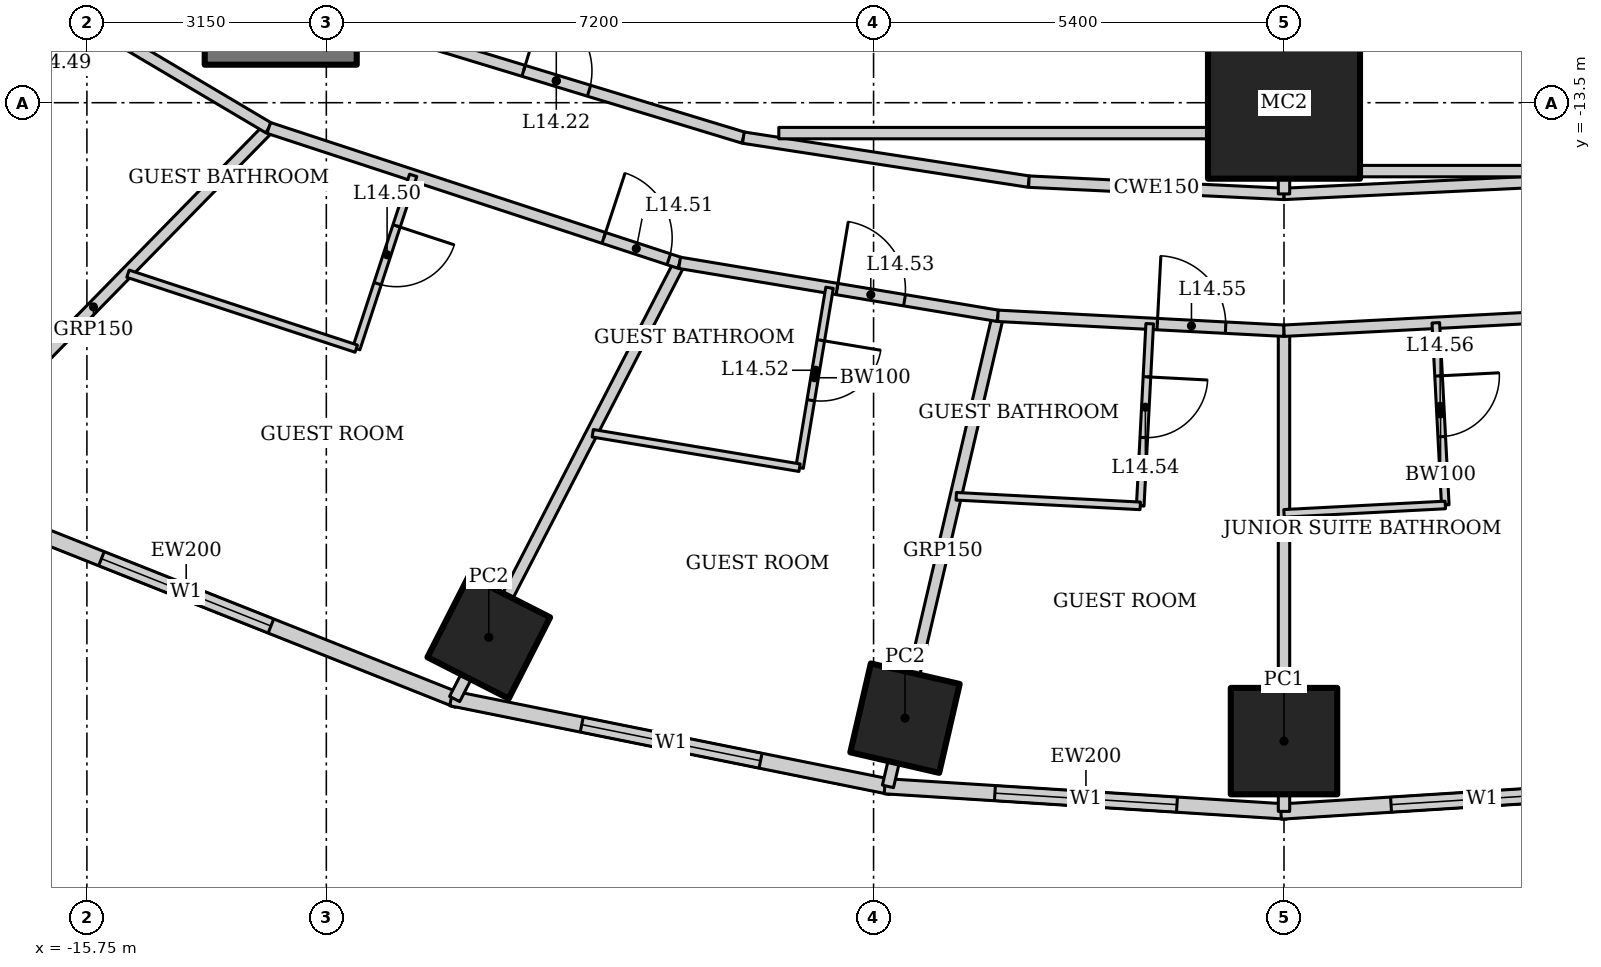
"""IFC4 building model, lengths in metres.
Left out: names, types, materials, properties, quantities, classifications, styles, units other than length and angle.
Written with IfcOpenShell. Run it as: python <this file> out.ifc"""

import sys

from ifc_helpers import new_model, si_unit, direction, frame, frame_2d, origin, origin_2d, place, context, subcontext, project, spatial, rectangle, hollow_rectangle, extrude, element, fill, save


model = new_model("IFC4")
c1 = context("Model", 3, precision=1e-05, world=origin(), true_north=direction((0.0, 1.0)))
c2 = subcontext(c1, "Body", "Model", "MODEL_VIEW")
j1 = project(units=[si_unit("LENGTHUNIT", "METRE"), si_unit("PLANEANGLEUNIT", "RADIAN")], contexts=[c1])
p1 = place(None, origin())
s1 = spatial("IfcSite", under=j1, at=p1, CompositionType="ELEMENT")
p2 = place(p1, origin())
s2 = spatial("IfcBuilding", under=s1, at=p2, CompositionType="ELEMENT")
p3 = place(p2, frame((0.0, 0.0, 65.8)))
s3 = spatial("IfcBuildingStorey", under=s2, at=p3, CompositionType="ELEMENT", Elevation=65.8)
p4 = place(p3, frame((0.0, -13.5, 0.0), z_axis=(0.0, 0.0, 1.0), x_axis=(1.0, 0.0, 0.0)))
e1 = element("IfcColumn", 1, at=p4, inside=s3, PredefinedType="COLUMN", context=c2, shape_type="SweptSolid", body=[
    extrude(hollow_rectangle(XDim=2.0, YDim=2.0, WallThickness=0.17, at=origin_2d()), origin(), (0.0, 0.0, 1.0), 3.6),
])
for number, where, z_axis, x_axis in (
    (2, (-10.463, -20.534, 0.0), (0.0, 0.0, 1.0), (0.454, 0.891, 0.0)),
    (3, (-4.986, -21.598, 0.0), (0.0, 0.0, 1.0), (0.225, 0.974, 0.0)),
):
    element("IfcColumn", number, at=place(p3, frame(where, z_axis=z_axis, x_axis=x_axis)), inside=s3, PredefinedType="COLUMN", context=c2, shape_type="SweptSolid", body=[
        extrude(hollow_rectangle(XDim=1.2, YDim=1.2, WallThickness=0.1, at=origin_2d()), origin(), (0.0, 0.0, 1.0), 3.6),
    ])
p5 = place(p3, frame((0.0, -21.9, 0.0), z_axis=(0.0, 0.0, 1.0), x_axis=(1.0, 0.0, 0.0)))
e4 = element("IfcColumn", 4, at=p5, inside=s3, PredefinedType="COLUMN", context=c2, shape_type="SweptSolid", body=[
    extrude(hollow_rectangle(XDim=1.4, YDim=1.4, WallThickness=0.1, at=origin_2d()), origin(), (0.0, 0.0, 1.0), 3.6),
])
p6 = place(p3, frame((-13.2, 13.0, 0.0), z_axis=(0.0, 0.0, 1.0), x_axis=(0.0, -1.0, 0.0)))
e5 = element("IfcWall", 5, at=p6, inside=s3, PredefinedType="SHEAR", context=c2, shape_type="SweptSolid", body=[
    extrude(rectangle(XDim=26.0, YDim=2.0, at=frame_2d((13.0, 0.0))), origin(), (0.0, 0.0, 1.0), 3.6),
])
p7 = place(p6, frame((12.1, 0.0, 0.0)))
e6 = element("IfcOpeningElement", 6, at=p7, cuts=e5, PredefinedType="OPENING", context=c2, shape_type="SweptSolid", body=[
    extrude(rectangle(XDim=1.8, YDim=2.1, at=frame_2d((0.9, 1.05))), frame((0.0, 1.01, 0.0), z_axis=(0.0, -1.0, 0.0), x_axis=(1.0, 0.0, 0.0)), (0.0, 0.0, 1.0), 2.02),
])
p8 = place(p3, frame((-18.018, -18.523, 0.0), z_axis=(0.0, 0.0, 1.0), x_axis=(0.929358351251, -0.369178892895, 0.0)))
e7 = element("IfcWall", 7, at=p8, inside=s3, PredefinedType="SOLIDWALL", context=c2, shape_type="SweptSolid", body=[
    extrude(rectangle(XDim=7.692, YDim=0.2, at=frame_2d((3.846, 0.0))), origin(), (0.0, 0.0, 1.0), 3.4),
])
p9 = place(p8, frame((2.646, 0.0, 0.5)))
e8 = element("IfcOpeningElement", 8, at=p9, cuts=e7, PredefinedType="OPENING", context=c2, shape_type="SweptSolid", body=[
    extrude(rectangle(XDim=2.4, YDim=2.2, at=frame_2d((1.2, 1.1))), frame((0.0, 0.11, 0.0), z_axis=(0.0, -1.0, 0.0), x_axis=(1.0, 0.0, 0.0)), (0.0, 0.0, 1.0), 0.22),
])
p10 = place(p3, frame((-10.957, -21.337, 0.0), z_axis=(0.0, 0.0, 1.0), x_axis=(0.980251657452, -0.197754110105, 0.0)))
e9 = element("IfcWall", 9, at=p10, inside=s3, PredefinedType="SOLIDWALL", context=c2, shape_type="SweptSolid", body=[
    extrude(rectangle(XDim=5.904, YDim=0.2, at=frame_2d((2.952, 0.0))), origin(), (0.0, 0.0, 1.0), 3.4),
])
p11 = place(p10, frame((1.752, 0.0, 0.5)))
e10 = element("IfcOpeningElement", 10, at=p11, cuts=e9, PredefinedType="OPENING", context=c2, shape_type="SweptSolid", body=[
    extrude(rectangle(XDim=2.4, YDim=2.2, at=frame_2d((1.2, 1.1))), frame((0.0, 0.11, 0.0), z_axis=(0.0, -1.0, 0.0), x_axis=(1.0, 0.0, 0.0)), (0.0, 0.0, 1.0), 0.22),
])
p12 = place(p3, frame((-5.253, -22.493, 0.0), z_axis=(0.0, 0.0, 1.0), x_axis=(0.998018582375, -0.062919863585, 0.0)))
e11 = element("IfcWall", 11, at=p12, inside=s3, PredefinedType="SOLIDWALL", context=c2, shape_type="SweptSolid", body=[
    extrude(rectangle(XDim=5.304, YDim=0.2, at=frame_2d((2.652, 0.0))), origin(), (0.0, 0.0, 1.0), 3.4),
])
p13 = place(p12, frame((1.452, 0.0, 0.5)))
e12 = element("IfcOpeningElement", 12, at=p13, cuts=e11, PredefinedType="OPENING", context=c2, shape_type="SweptSolid", body=[
    extrude(rectangle(XDim=2.4, YDim=2.2, at=frame_2d((1.2, 1.1))), frame((0.0, 0.11, 0.0), z_axis=(0.0, -1.0, 0.0), x_axis=(1.0, 0.0, 0.0)), (0.0, 0.0, 1.0), 0.22),
])
p14 = place(p3, frame((-0.041, -22.827, 0.0), z_axis=(0.0, 0.0, 1.0), x_axis=(0.998018582375, 0.062919863585, 0.0)))
e13 = element("IfcWall", 13, at=p14, inside=s3, PredefinedType="SOLIDWALL", context=c2, shape_type="SweptSolid", body=[
    extrude(rectangle(XDim=5.304, YDim=0.2, at=frame_2d((2.652, 0.0))), origin(), (0.0, 0.0, 1.0), 3.4),
])
p15 = place(p14, frame((1.452, 0.0, 0.5)))
e14 = element("IfcOpeningElement", 14, at=p15, cuts=e13, PredefinedType="OPENING", context=c2, shape_type="SweptSolid", body=[
    extrude(rectangle(XDim=2.4, YDim=2.2, at=frame_2d((1.2, 1.1))), frame((0.0, 0.11, 0.0), z_axis=(0.0, -1.0, 0.0), x_axis=(1.0, 0.0, 0.0)), (0.0, 0.0, 1.0), 0.22),
])
p16 = place(p3, frame((-17.97, -18.542, 0.0), z_axis=(0.0, 0.0, 1.0), x_axis=(0.699736251994, 0.714401272147, 0.0)))
e15 = element("IfcWall", 15, at=p16, inside=s3, PredefinedType="PARTITIONING", context=c2, shape_type="SweptSolid", body=[
    extrude(rectangle(XDim=6.593, YDim=0.15, at=frame_2d((3.296, 0.0))), origin(), (0.0, 0.0, 1.0), 2.528),
])
p17 = place(p3, frame((-10.912, -21.346, 0.0), z_axis=(0.0, 0.0, 1.0), x_axis=(0.458384799126, 0.888753833145, 0.0)))
e16 = element("IfcWall", 16, at=p17, inside=s3, PredefinedType="PARTITIONING", context=c2, shape_type="SweptSolid", body=[
    extrude(rectangle(XDim=6.457, YDim=0.15, at=frame_2d((3.229, 0.0))), origin(), (0.0, 0.0, 1.0), 2.528),
])
p18 = place(p3, frame((-5.211, -22.496, 0.0), z_axis=(0.0, 0.0, 1.0), x_axis=(0.227536694087, 0.973769507042, 0.0)))
e17 = element("IfcWall", 17, at=p18, inside=s3, PredefinedType="PARTITIONING", context=c2, shape_type="SweptSolid", body=[
    extrude(rectangle(XDim=6.358, YDim=0.15, at=frame_2d((3.179, 0.0))), origin(), (0.0, 0.0, 1.0), 2.767),
])
p19 = place(p3, frame((0.0, -22.825, 0.0), z_axis=(0.0, 0.0, 1.0), x_axis=(0.0, 1.0, 0.0)))
e18 = element("IfcWall", 18, at=p19, inside=s3, PredefinedType="PARTITIONING", context=c2, shape_type="SweptSolid", body=[
    extrude(rectangle(XDim=6.325, YDim=0.15, at=frame_2d((3.162, 0.0))), origin(), (0.0, 0.0, 1.0), 2.924),
])
p20 = place(p3, frame((-18.681, -10.675, 0.0), z_axis=(0.0, 0.0, 1.0), x_axis=(0.860147339762, -0.510045639036, 0.0)))
e19 = element("IfcWall", 19, at=p20, inside=s3, PredefinedType="PARTITIONING", context=c2, shape_type="SweptSolid", body=[
    extrude(rectangle(XDim=6.19, YDim=0.15, at=frame_2d((3.095, 0.0))), origin(), (0.0, 0.0, 1.0), 3.45),
])
p21 = place(p20, frame((2.505, 0.0, 0.0)))
e20 = element("IfcOpeningElement", 20, at=p21, cuts=e19, PredefinedType="OPENING", context=c2, shape_type="SweptSolid", body=[
    extrude(rectangle(XDim=0.9, YDim=2.1, at=frame_2d((0.45, 1.05))), frame((0.0, 0.085, 0.0), z_axis=(0.0, -1.0, 0.0), x_axis=(1.0, 0.0, 0.0)), (0.0, 0.0, 1.0), 0.17),
])
p22 = place(p3, frame((-13.357, -13.832, 0.0), z_axis=(0.0, 0.0, 1.0), x_axis=(0.950106803111, -0.311924770869, 0.0)))
e21 = element("IfcWall", 21, at=p22, inside=s3, PredefinedType="PARTITIONING", context=c2, shape_type="SweptSolid", body=[
    extrude(rectangle(XDim=5.689, YDim=0.15, at=frame_2d((2.845, 0.0))), origin(), (0.0, 0.0, 1.0), 3.45),
])
p23 = place(p22, frame((4.639, 0.0, 0.0)))
e22 = element("IfcOpeningElement", 22, at=p23, cuts=e21, PredefinedType="OPENING", context=c2, shape_type="SweptSolid", body=[
    extrude(rectangle(XDim=0.9, YDim=2.1, at=frame_2d((0.45, 1.05))), frame((0.0, 0.085, 0.0), z_axis=(0.0, -1.0, 0.0), x_axis=(1.0, 0.0, 0.0)), (0.0, 0.0, 1.0), 0.17),
])
p24 = place(p3, frame((-7.952, -15.607, 0.0), z_axis=(0.0, 0.0, 1.0), x_axis=(0.98641101506, -0.164296407044, 0.0)))
e23 = element("IfcWall", 23, at=p24, inside=s3, PredefinedType="PARTITIONING", context=c2, shape_type="SweptSolid", body=[
    extrude(rectangle(XDim=4.245, YDim=0.15, at=frame_2d((2.123, 0.0))), origin(), (0.0, 0.0, 1.0), 3.45),
])
p25 = place(p24, frame((2.1, 0.0, 0.0)))
e24 = element("IfcOpeningElement", 24, at=p25, cuts=e23, PredefinedType="OPENING", context=c2, shape_type="SweptSolid", body=[
    extrude(rectangle(XDim=0.9, YDim=2.1, at=frame_2d((0.45, 1.05))), frame((0.0, 0.085, 0.0), z_axis=(0.0, -1.0, 0.0), x_axis=(1.0, 0.0, 0.0)), (0.0, 0.0, 1.0), 0.17),
])
p26 = place(p3, frame((-3.764, -16.304, 0.0), z_axis=(0.0, 0.0, 1.0), x_axis=(0.998649848759, -0.05194689186, 0.0)))
e25 = element("IfcWall", 25, at=p26, inside=s3, PredefinedType="PARTITIONING", context=c2, shape_type="SweptSolid", body=[
    extrude(rectangle(XDim=3.769, YDim=0.15, at=frame_2d((1.885, 0.0))), origin(), (0.0, 0.0, 1.0), 3.45),
])
p27 = place(p26, frame((2.1, 0.0, 0.0)))
e26 = element("IfcOpeningElement", 26, at=p27, cuts=e25, PredefinedType="OPENING", context=c2, shape_type="SweptSolid", body=[
    extrude(rectangle(XDim=0.9, YDim=2.1, at=frame_2d((0.45, 1.05))), frame((0.0, 0.085, 0.0), z_axis=(0.0, -1.0, 0.0), x_axis=(1.0, 0.0, 0.0)), (0.0, 0.0, 1.0), 0.17),
])
p28 = place(p3, frame((0.0, -16.5, 0.0), z_axis=(0.0, 0.0, 1.0), x_axis=(0.998649848759, 0.05194689186, 0.0)))
e27 = element("IfcWall", 27, at=p28, inside=s3, PredefinedType="PARTITIONING", context=c2, shape_type="SweptSolid", body=[
    extrude(rectangle(XDim=3.769, YDim=0.15, at=frame_2d((1.885, 0.0))), origin(), (0.0, 0.0, 1.0), 3.45),
])
p29 = place(p3, frame((-12.036, -12.464, 0.0), z_axis=(0.0, 0.0, 1.0), x_axis=(0.956795045135, -0.290763205385, 0.0)))
e28 = element("IfcWall", 28, at=p29, inside=s3, PredefinedType="PARTITIONING", context=c2, shape_type="SweptSolid", body=[
    extrude(rectangle(XDim=5.146, YDim=0.15, at=frame_2d((2.573, 0.0))), origin(), (0.0, 0.0, 1.0), 3.45),
])
p30 = place(p29, frame((2.123, 0.0, 0.0)))
e29 = element("IfcOpeningElement", 29, at=p30, cuts=e28, PredefinedType="OPENING", context=c2, shape_type="SweptSolid", body=[
    extrude(rectangle(XDim=0.9, YDim=2.1, at=frame_2d((0.45, 1.05))), frame((0.0, 0.085, 0.0), z_axis=(0.0, -1.0, 0.0), x_axis=(1.0, 0.0, 0.0)), (0.0, 0.0, 1.0), 0.17),
])
p31 = place(p3, frame((-7.113, -13.96, 0.0), z_axis=(0.0, 0.0, 1.0), x_axis=(0.988343461108, -0.152240608529, 0.0)))
e30 = element("IfcWall", 30, at=p31, inside=s3, PredefinedType="PARTITIONING", context=c2, shape_type="SweptSolid", body=[
    extrude(rectangle(XDim=3.801, YDim=0.15, at=frame_2d((1.9, 0.0))), origin(), (0.0, 0.0, 1.0), 3.45),
])
for number, where, z_axis, x_axis in (
    (31, (-3.356, -14.538, 0.0), (0.0, 0.0, 1.0), (0.999, -0.048, 0.0)),
    (32, (0.0, -14.7, 0.0), (0.0, 0.0, 1.0), (0.999, 0.048, 0.0)),
):
    element("IfcWall", number, at=place(p3, frame(where, z_axis=z_axis, x_axis=x_axis)), inside=s3, PredefinedType="PARTITIONING", context=c2, shape_type="SweptSolid", body=[
        extrude(rectangle(XDim=3.36, YDim=0.15, at=frame_2d((1.68, 0.0))), origin(), (0.0, 0.0, 1.0), 3.45),
    ])
p32 = place(p3, frame((0.0, -9.2, 0.0), z_axis=(0.0, 0.0, 1.0), x_axis=(0.0, -1.0, 0.0)))
e33 = element("IfcWall", 33, at=p32, inside=s3, PredefinedType="PARTITIONING", context=c2, shape_type="SweptSolid", body=[
    extrude(rectangle(XDim=5.5, YDim=0.15, at=frame_2d((2.75, 0.0))), origin(), (0.0, 0.0, 1.0), 2.924),
])
p33 = place(p3, frame((-6.647, -13.9, 0.0), z_axis=(0.0, 0.0, 1.0), x_axis=(1.0, 0.0, 0.0)))
e34 = element("IfcWall", 34, at=p33, inside=s3, PredefinedType="PARTITIONING", context=c2, shape_type="SweptSolid", body=[
    extrude(rectangle(XDim=6.647, YDim=0.15, at=frame_2d((3.323, 0.0))), origin(), (0.0, 0.0, 1.0), 3.45),
])
p34 = place(p3, frame((0.0, -14.4, 0.0), z_axis=(0.0, 0.0, 1.0), x_axis=(1.0, 0.0, 0.0)))
e35 = element("IfcWall", 35, at=p34, inside=s3, PredefinedType="PARTITIONING", context=c2, shape_type="SweptSolid", body=[
    extrude(rectangle(XDim=3.401, YDim=0.15, at=frame_2d((1.701, 0.0))), origin(), (0.0, 0.0, 1.0), 3.45),
])
p35 = place(p3, frame((-11.457, -14.456, 0.0), z_axis=(0.0, 0.0, 1.0), x_axis=(-0.311890952591, -0.950117905153, 0.0)))
e36 = element("IfcWall", 36, at=p35, inside=s3, PredefinedType="PARTITIONING", context=c2, shape_type="SweptSolid", body=[
    extrude(rectangle(XDim=2.4, YDim=0.1, at=frame_2d((1.2, 0.0))), origin(), (0.0, 0.0, 1.0), 3.45),
])
p36 = place(p35, frame((0.7, 0.0, 0.0)))
e37 = element("IfcOpeningElement", 37, at=p36, cuts=e36, PredefinedType="OPENING", context=c2, shape_type="SweptSolid", body=[
    extrude(rectangle(XDim=0.8, YDim=2.1, at=frame_2d((0.4, 1.05))), frame((0.0, 0.06, 0.0), z_axis=(0.0, -1.0, 0.0), x_axis=(1.0, 0.0, 0.0)), (0.0, 0.0, 1.0), 0.12),
])
p37 = place(p3, frame((-12.206, -16.736, 0.0), z_axis=(0.0, 0.0, 1.0), x_axis=(-0.950109912386, 0.311915300018, 0.0)))
e38 = element("IfcWall", 38, at=p37, inside=s3, PredefinedType="PARTITIONING", context=c2, shape_type="SweptSolid", body=[
    extrude(rectangle(XDim=3.161, YDim=0.1, at=frame_2d((1.581, 0.0))), origin(), (0.0, 0.0, 1.0), 3.45),
])
p38 = place(p3, frame((-5.979, -15.935, 0.0), z_axis=(0.0, 0.0, 1.0), x_axis=(-0.164283516215, -0.986413162067, 0.0)))
e39 = element("IfcWall", 39, at=p38, inside=s3, PredefinedType="PARTITIONING", context=c2, shape_type="SweptSolid", body=[
    extrude(rectangle(XDim=2.4, YDim=0.1, at=frame_2d((1.2, 0.0))), origin(), (0.0, 0.0, 1.0), 2.914),
])
p39 = place(p38, frame((0.7, 0.0, 0.0)))
e40 = element("IfcOpeningElement", 40, at=p39, cuts=e39, PredefinedType="OPENING", context=c2, shape_type="SweptSolid", body=[
    extrude(rectangle(XDim=0.8, YDim=2.1, at=frame_2d((0.4, 1.05))), frame((0.0, 0.06, 0.0), z_axis=(0.0, -1.0, 0.0), x_axis=(1.0, 0.0, 0.0)), (0.0, 0.0, 1.0), 0.12),
])
p40 = place(p3, frame((-6.374, -18.303, 0.0), z_axis=(0.0, 0.0, 1.0), x_axis=(-0.98640348956, 0.164341582641, 0.0)))
e41 = element("IfcWall", 41, at=p40, inside=s3, PredefinedType="PARTITIONING", context=c2, shape_type="SweptSolid", body=[
    extrude(rectangle(XDim=2.759, YDim=0.1, at=frame_2d((1.379, 0.0))), origin(), (0.0, 0.0, 1.0), 3.45),
])
p41 = place(p3, frame((-1.767, -16.408, 0.0), z_axis=(0.0, 0.0, 1.0), x_axis=(-0.051982187452, -0.998648012158, 0.0)))
e42 = element("IfcWall", 42, at=p41, inside=s3, PredefinedType="PARTITIONING", context=c2, shape_type="SweptSolid", body=[
    extrude(rectangle(XDim=2.4, YDim=0.1, at=frame_2d((1.2, 0.0))), origin(), (0.0, 0.0, 1.0), 2.749),
])
p42 = place(p41, frame((0.7, 0.0, 0.0)))
e43 = element("IfcOpeningElement", 43, at=p42, cuts=e42, PredefinedType="OPENING", context=c2, shape_type="SweptSolid", body=[
    extrude(rectangle(XDim=0.8, YDim=2.1, at=frame_2d((0.4, 1.05))), frame((0.0, 0.06, 0.0), z_axis=(0.0, -1.0, 0.0), x_axis=(1.0, 0.0, 0.0)), (0.0, 0.0, 1.0), 0.12),
])
p43 = place(p3, frame((-1.892, -18.805, 0.0), z_axis=(0.0, 0.0, 1.0), x_axis=(-0.998648540987, 0.051972026944, 0.0)))
e44 = element("IfcWall", 44, at=p43, inside=s3, PredefinedType="PARTITIONING", context=c2, shape_type="SweptSolid", body=[
    extrude(rectangle(XDim=2.424, YDim=0.1, at=frame_2d((1.212, 0.0))), origin(), (0.0, 0.0, 1.0), 3.45),
])
p44 = place(p3, frame((1.997, -16.396, 0.0), z_axis=(0.0, 0.0, 1.0), x_axis=(0.051982187452, -0.998648012158, 0.0)))
e45 = element("IfcWall", 45, at=p44, inside=s3, PredefinedType="PARTITIONING", context=c2, shape_type="SweptSolid", body=[
    extrude(rectangle(XDim=2.4, YDim=0.1, at=frame_2d((1.2, 0.0))), origin(), (0.0, 0.0, 1.0), 2.749),
])
p45 = place(p44, frame((0.7, 0.0, 0.0)))
e46 = element("IfcOpeningElement", 46, at=p45, cuts=e45, PredefinedType="OPENING", context=c2, shape_type="SweptSolid", body=[
    extrude(rectangle(XDim=0.8, YDim=2.1, at=frame_2d((0.4, 1.05))), frame((0.0, 0.06, 0.0), z_axis=(0.0, -1.0, 0.0), x_axis=(1.0, 0.0, 0.0)), (0.0, 0.0, 1.0), 0.12),
])
p46 = place(p3, frame((2.122, -18.793, 0.0), z_axis=(0.0, 0.0, 1.0), x_axis=(-0.998644675281, -0.052046253785, 0.0)))
e47 = element("IfcWall", 47, at=p46, inside=s3, PredefinedType="PARTITIONING", context=c2, shape_type="SweptSolid", body=[
    extrude(rectangle(XDim=2.125, YDim=0.1, at=frame_2d((1.062, 0.0))), origin(), (0.0, 0.0, 1.0), 3.45),
])
p47 = place(p9, origin())
e48 = element("IfcWindow", 48, at=p47, inside=s3, PartitioningType="SINGLE_PANEL", PredefinedType="WINDOW", context=c2, shape_type="SweptSolid", body=[
    extrude(rectangle(XDim=2.4, YDim=2.2, at=frame_2d((1.2, 1.1))), frame((0.0, 0.03, 0.0), z_axis=(0.0, -1.0, 0.0), x_axis=(1.0, 0.0, 0.0)), (0.0, 0.0, 1.0), 0.06),
])
fill(e8, e48)
p48 = place(p11, origin())
e49 = element("IfcWindow", 49, at=p48, inside=s3, PartitioningType="SINGLE_PANEL", PredefinedType="WINDOW", context=c2, shape_type="SweptSolid", body=[
    extrude(rectangle(XDim=2.4, YDim=2.2, at=frame_2d((1.2, 1.1))), frame((0.0, 0.03, 0.0), z_axis=(0.0, -1.0, 0.0), x_axis=(1.0, 0.0, 0.0)), (0.0, 0.0, 1.0), 0.06),
])
fill(e10, e49)
p49 = place(p13, origin())
e50 = element("IfcWindow", 50, at=p49, inside=s3, PartitioningType="SINGLE_PANEL", PredefinedType="WINDOW", context=c2, shape_type="SweptSolid", body=[
    extrude(rectangle(XDim=2.4, YDim=2.2, at=frame_2d((1.2, 1.1))), frame((0.0, 0.03, 0.0), z_axis=(0.0, -1.0, 0.0), x_axis=(1.0, 0.0, 0.0)), (0.0, 0.0, 1.0), 0.06),
])
fill(e12, e50)
p50 = place(p15, origin())
e51 = element("IfcWindow", 51, at=p50, inside=s3, PartitioningType="SINGLE_PANEL", PredefinedType="WINDOW", context=c2, shape_type="SweptSolid", body=[
    extrude(rectangle(XDim=2.4, YDim=2.2, at=frame_2d((1.2, 1.1))), frame((0.0, 0.03, 0.0), z_axis=(0.0, -1.0, 0.0), x_axis=(1.0, 0.0, 0.0)), (0.0, 0.0, 1.0), 0.06),
])
fill(e14, e51)
p51 = place(p30, origin())
e52 = element("IfcDoor", 52, at=p51, inside=s3, OperationType="SINGLE_SWING_LEFT", PredefinedType="DOOR", context=c2, shape_type="SweptSolid", body=[
    extrude(rectangle(XDim=0.9, YDim=2.1, at=frame_2d((0.45, 1.05))), frame((0.0, 0.025, 0.0), z_axis=(0.0, -1.0, 0.0), x_axis=(1.0, 0.0, 0.0)), (0.0, 0.0, 1.0), 0.05),
])
fill(e29, e52)
p52 = place(p36, origin())
e53 = element("IfcDoor", 53, at=p52, inside=s3, OperationType="SINGLE_SWING_LEFT", PredefinedType="DOOR", context=c2, shape_type="SweptSolid", body=[
    extrude(rectangle(XDim=0.8, YDim=2.1, at=frame_2d((0.4, 1.05))), frame((0.0, 0.025, 0.0), z_axis=(0.0, -1.0, 0.0), x_axis=(1.0, 0.0, 0.0)), (0.0, 0.0, 1.0), 0.05),
])
fill(e37, e53)
p53 = place(p23, origin())
e54 = element("IfcDoor", 54, at=p53, inside=s3, OperationType="SINGLE_SWING_LEFT", PredefinedType="DOOR", context=c2, shape_type="SweptSolid", body=[
    extrude(rectangle(XDim=0.9, YDim=2.1, at=frame_2d((0.45, 1.05))), frame((0.0, 0.025, 0.0), z_axis=(0.0, -1.0, 0.0), x_axis=(1.0, 0.0, 0.0)), (0.0, 0.0, 1.0), 0.05),
])
fill(e22, e54)
p54 = place(p39, origin())
e55 = element("IfcDoor", 55, at=p54, inside=s3, OperationType="SINGLE_SWING_LEFT", PredefinedType="DOOR", context=c2, shape_type="SweptSolid", body=[
    extrude(rectangle(XDim=0.8, YDim=2.1, at=frame_2d((0.4, 1.05))), frame((0.0, 0.025, 0.0), z_axis=(0.0, -1.0, 0.0), x_axis=(1.0, 0.0, 0.0)), (0.0, 0.0, 1.0), 0.05),
])
fill(e40, e55)
p55 = place(p25, origin())
e56 = element("IfcDoor", 56, at=p55, inside=s3, OperationType="SINGLE_SWING_LEFT", PredefinedType="DOOR", context=c2, shape_type="SweptSolid", body=[
    extrude(rectangle(XDim=0.9, YDim=2.1, at=frame_2d((0.45, 1.05))), frame((0.0, 0.025, 0.0), z_axis=(0.0, -1.0, 0.0), x_axis=(1.0, 0.0, 0.0)), (0.0, 0.0, 1.0), 0.05),
])
fill(e24, e56)
p56 = place(p42, origin())
e57 = element("IfcDoor", 57, at=p56, inside=s3, OperationType="SINGLE_SWING_LEFT", PredefinedType="DOOR", context=c2, shape_type="SweptSolid", body=[
    extrude(rectangle(XDim=0.8, YDim=2.1, at=frame_2d((0.4, 1.05))), frame((0.0, 0.025, 0.0), z_axis=(0.0, -1.0, 0.0), x_axis=(1.0, 0.0, 0.0)), (0.0, 0.0, 1.0), 0.05),
])
fill(e43, e57)
p57 = place(p27, origin())
e58 = element("IfcDoor", 58, at=p57, inside=s3, OperationType="SINGLE_SWING_LEFT", PredefinedType="DOOR", context=c2, shape_type="SweptSolid", body=[
    extrude(rectangle(XDim=0.9, YDim=2.1, at=frame_2d((0.45, 1.05))), frame((0.0, 0.025, 0.0), z_axis=(0.0, -1.0, 0.0), x_axis=(1.0, 0.0, 0.0)), (0.0, 0.0, 1.0), 0.05),
])
fill(e26, e58)
p58 = place(p45, origin())
e59 = element("IfcDoor", 59, at=p58, inside=s3, OperationType="SINGLE_SWING_LEFT", PredefinedType="DOOR", context=c2, shape_type="SweptSolid", body=[
    extrude(rectangle(XDim=0.8, YDim=2.1, at=frame_2d((0.4, 1.05))), frame((0.0, 0.025, 0.0), z_axis=(0.0, -1.0, 0.0), x_axis=(1.0, 0.0, 0.0)), (0.0, 0.0, 1.0), 0.05),
])
fill(e46, e59)
save(model, sys.argv[1])
